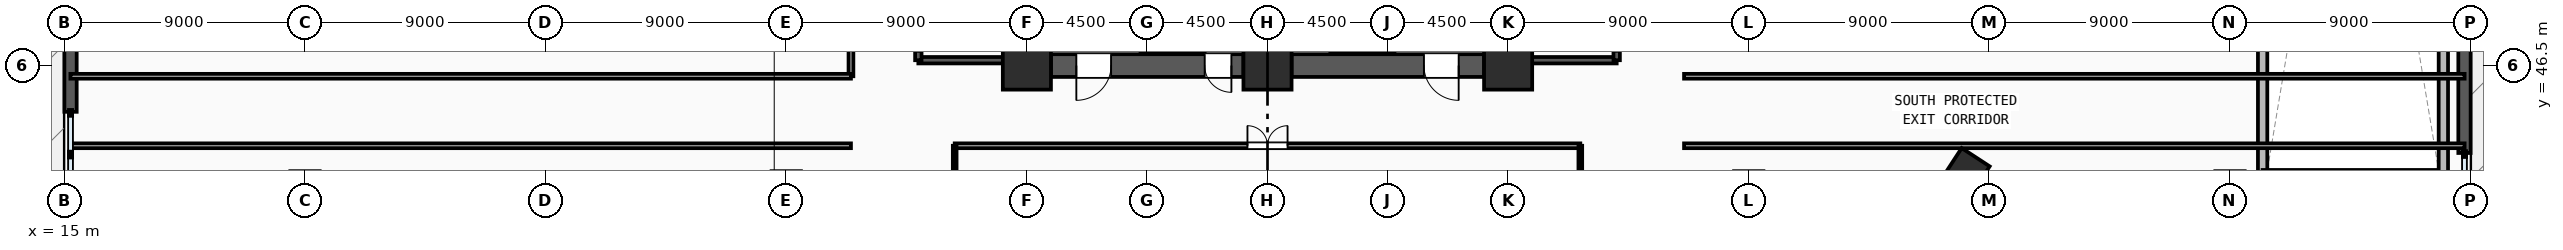
"""IFC4 building model, lengths in metres.
Left out: names, types, materials, properties, quantities, classifications, styles, units other than length and angle.
Written with IfcOpenShell. Run it as: python <this file> out.ifc"""

import sys

from ifc_helpers import new_model, si_unit, direction, frame, frame_2d, origin, origin_2d, place, context, subcontext, project, spatial, rectangle, extrude, source, transform, mapped, element, fill, save


model = new_model("IFC4")
c1 = context("Model", 3, precision=1e-05, world=origin(), true_north=direction((0.0, 1.0)))
c2 = subcontext(c1, "Body", "Model", "MODEL_VIEW")
j1 = project(units=[si_unit("LENGTHUNIT", "METRE"), si_unit("PLANEANGLEUNIT", "RADIAN")], contexts=[c1])
p1 = place(None, origin())
s1 = spatial("IfcSite", under=j1, at=p1, CompositionType="ELEMENT")
p2 = place(p1, origin())
s2 = spatial("IfcBuilding", under=s1, at=p2, CompositionType="ELEMENT")
p3 = place(p2, origin())
s3 = spatial("IfcBuildingStorey", under=s2, at=p3, CompositionType="ELEMENT", Elevation=0.0)
m1 = source(origin(), c2, "Body", "SweptSolid", [
    extrude(rectangle(XDim=1.8, YDim=1.8, at=origin_2d()), origin(), (0.0, 0.0, 1.0), 5.4),
])
for number, where, z_axis, x_axis in (
    (1, (51.0, 46.5, 0.0), (0.0, 0.0, 1.0), (1.0, 0.0, 0.0)),
    (2, (60.0, 46.5, 0.0), (0.0, 0.0, 1.0), (1.0, 0.0, 0.0)),
    (3, (69.0, 46.5, 0.0), (0.0, 0.0, 1.0), (1.0, 0.0, 0.0)),
):
    element("IfcColumn", number, at=place(p3, frame(where, z_axis=z_axis, x_axis=x_axis)), inside=s3, PredefinedType="COLUMN", context=c2, shape_type="MappedRepresentation", body=[
        mapped(m1, transform((0.0, 0.0, 0.0), x_axis=(1.0, 0.0, 0.0), y_axis=(0.0, 1.0, 0.0), z_axis=(0.0, 0.0, 1.0), scale=1.0)),
    ])
m2 = source(origin(), c2, "Body", "SweptSolid", [
    extrude(rectangle(XDim=1.55, YDim=1.25, at=origin_2d()), origin(), (0.0, 0.0, 1.0), 5.4),
])
p4 = place(p3, frame((86.064, 42.423, 0.0), z_axis=(0.0, 0.0, 1.0), x_axis=(0.546978918409, 0.837146380758, 0.0)))
e4 = element("IfcColumn", 4, at=p4, inside=s3, PredefinedType="COLUMN", context=c2, shape_type="MappedRepresentation", body=[
    mapped(m2, transform((0.0, 0.0, 0.0), x_axis=(1.0, 0.0, 0.0), y_axis=(0.0, 1.0, 0.0), z_axis=(0.0, 0.0, 1.0), scale=1.0)),
])
p5 = place(p3, frame((104.77, 43.23, 0.0), z_axis=(0.0, 0.0, 1.0), x_axis=(0.0, 1.0, 0.0)))
e5 = element("IfcWall", 5, at=p5, inside=s3, PredefinedType="SOLIDWALL", context=c2, shape_type="SweptSolid", body=[
    extrude(rectangle(XDim=42.74, YDim=0.46, at=frame_2d((21.37, 0.0))), origin(), (0.0, 0.0, 1.0), 5.15),
])
m3 = source(origin(), c2, "Body", "SweptSolid", [
    extrude(rectangle(XDim=4.0, YDim=3.8, at=frame_2d((2.0, 1.9))), frame((0.0, 0.24, 0.0), z_axis=(0.0, -1.0, 0.0), x_axis=(1.0, 0.0, 0.0)), (0.0, 0.0, 1.0), 0.48),
])
p6 = place(p5, frame((13.23, 0.0, 0.0)))
e6 = element("IfcOpeningElement", 6, at=p6, cuts=e5, PredefinedType="OPENING", context=c2, shape_type="MappedRepresentation", body=[
    mapped(m3, transform((0.0, 0.0, 0.0), x_axis=(1.0, 0.0, 0.0), y_axis=(0.0, 1.0, 0.0), z_axis=(0.0, 0.0, 1.0), scale=1.0)),
])
p7 = place(p3, frame((15.23, 64.77, 0.0), z_axis=(0.0, 0.0, 1.0), x_axis=(0.0, -1.0, 0.0)))
e7 = element("IfcWall", 7, at=p7, inside=s3, PredefinedType="SOLIDWALL", context=c2, shape_type="SweptSolid", body=[
    extrude(rectangle(XDim=20.0, YDim=0.46, at=frame_2d((10.0, 0.0))), origin(), (0.0, 0.0, 1.0), 5.15),
])
m4 = source(origin(), c2, "Body", "SweptSolid", [
    extrude(rectangle(XDim=2.1, YDim=2.4, at=frame_2d((1.05, 1.2))), frame((0.0, 0.24, 0.0), z_axis=(0.0, -1.0, 0.0), x_axis=(1.0, 0.0, 0.0)), (0.0, 0.0, 1.0), 0.48),
])
p8 = place(p7, frame((10.22, 0.0, 0.0)))
e8 = element("IfcOpeningElement", 8, at=p8, cuts=e7, PredefinedType="OPENING", context=c2, shape_type="MappedRepresentation", body=[
    mapped(m4, transform((0.0, 0.0, 0.0), x_axis=(1.0, 0.0, 0.0), y_axis=(0.0, 1.0, 0.0), z_axis=(0.0, 0.0, 1.0), scale=1.0)),
])
for number, where, z_axis, x_axis in (
    (9, (97.22, 42.42, 0.0), (0.0, 0.0, 1.0), (0.0, 1.0, 0.0)),
    (10, (103.98, 42.42, 0.0), (0.0, 0.0, 1.0), (0.0, 1.0, 0.0)),
):
    element("IfcWall", number, at=place(p3, frame(where, z_axis=z_axis, x_axis=x_axis)), inside=s3, PredefinedType="SOLIDWALL", context=c2, shape_type="SweptSolid", body=[
        extrude(rectangle(XDim=43.98, YDim=0.35, at=frame_2d((21.99, 0.0))), origin(), (0.0, 0.0, 1.0), 5.15),
    ])
p9 = place(p3, frame((68.1, 46.5, 0.0), z_axis=(0.0, 0.0, 1.0), x_axis=(-1.0, 0.0, 0.0)))
e11 = element("IfcWall", 11, at=p9, inside=s3, PredefinedType="SHEAR", context=c2, shape_type="SweptSolid", body=[
    extrude(rectangle(XDim=7.2, YDim=0.85, at=frame_2d((3.6, 0.0))), origin(), (0.0, 0.0, 1.0), 5.15),
])
m5 = source(origin(), c2, "Body", "SweptSolid", [
    extrude(rectangle(XDim=1.3, YDim=2.2, at=frame_2d((0.65, 1.1))), frame((0.0, 0.435, 0.0), z_axis=(0.0, -1.0, 0.0), x_axis=(1.0, 0.0, 0.0)), (0.0, 0.0, 1.0), 0.87),
])
p10 = place(p9, frame((0.95, 0.0, 0.0)))
e12 = element("IfcOpeningElement", 12, at=p10, cuts=e11, PredefinedType="OPENING", context=c2, shape_type="MappedRepresentation", body=[
    mapped(m5, transform((0.0, 0.0, 0.0), x_axis=(1.0, 0.0, 0.0), y_axis=(0.0, 1.0, 0.0), z_axis=(0.0, 0.0, 1.0), scale=1.0)),
])
p11 = place(p3, frame((59.1, 46.5, 0.0), z_axis=(0.0, 0.0, 1.0), x_axis=(-1.0, 0.0, 0.0)))
e13 = element("IfcWall", 13, at=p11, inside=s3, PredefinedType="SHEAR", context=c2, shape_type="SweptSolid", body=[
    extrude(rectangle(XDim=7.2, YDim=0.85, at=frame_2d((3.6, 0.0))), origin(), (0.0, 0.0, 1.0), 5.15),
])
p12 = place(p11, frame((4.95, 0.0, 0.0)))
e14 = element("IfcOpeningElement", 14, at=p12, cuts=e13, PredefinedType="OPENING", context=c2, shape_type="MappedRepresentation", body=[
    mapped(m5, transform((0.0, 0.0, 0.0), x_axis=(1.0, 0.0, 0.0), y_axis=(0.0, 1.0, 0.0), z_axis=(0.0, 0.0, 1.0), scale=1.0)),
])
m6 = source(origin(), c2, "Body", "SweptSolid", [
    extrude(rectangle(XDim=1.0, YDim=2.2, at=frame_2d((0.5, 1.1))), frame((0.0, 0.435, 0.0), z_axis=(0.0, -1.0, 0.0), x_axis=(1.0, 0.0, 0.0)), (0.0, 0.0, 1.0), 0.87),
])
p13 = place(p11, frame((0.45, 0.0, 0.0)))
e15 = element("IfcOpeningElement", 15, at=p13, cuts=e13, PredefinedType="OPENING", context=c2, shape_type="MappedRepresentation", body=[
    mapped(m6, transform((0.0, 0.0, 0.0), x_axis=(1.0, 0.0, 0.0), y_axis=(0.0, 1.0, 0.0), z_axis=(0.0, 0.0, 1.0), scale=1.0)),
])
p14 = place(p3, frame((46.94, 46.7, 0.0), z_axis=(0.0, 0.0, 1.0), x_axis=(1.0, 0.0, 0.0)))
e16 = element("IfcWall", 16, at=p14, inside=s3, PredefinedType="SOLIDWALL", context=c2, shape_type="SweptSolid", body=[
    extrude(rectangle(XDim=3.44, YDim=0.24, at=frame_2d((1.72, 0.0))), origin(), (0.0, 0.0, 1.0), 5.15),
])
p15 = place(p3, frame((50.38, 46.7, 0.0), z_axis=(0.0, 0.0, 1.0), x_axis=(0.0, 1.0, 0.0)))
e17 = element("IfcWall", 17, at=p15, inside=s3, PredefinedType="SOLIDWALL", context=c2, shape_type="SweptSolid", body=[
    extrude(rectangle(XDim=7.82, YDim=0.24, at=frame_2d((3.91, 0.0))), origin(), (0.0, 0.0, 1.0), 5.15),
])
p16 = place(p3, frame((46.94, 54.52, 0.0), z_axis=(0.0, 0.0, 1.0), x_axis=(0.0, -1.0, 0.0)))
e18 = element("IfcWall", 18, at=p16, inside=s3, PredefinedType="SOLIDWALL", context=c2, shape_type="SweptSolid", body=[
    extrude(rectangle(XDim=7.82, YDim=0.24, at=frame_2d((3.91, 0.0))), origin(), (0.0, 0.0, 1.0), 5.15),
])
m7 = source(origin(), c2, "Body", "SweptSolid", [
    extrude(rectangle(XDim=1.2, YDim=2.2, at=frame_2d((0.6, 1.1))), frame((0.0, 0.13, 0.0), z_axis=(0.0, -1.0, 0.0), x_axis=(1.0, 0.0, 0.0)), (0.0, 0.0, 1.0), 0.26),
])
p17 = place(p16, frame((6.3, 0.0, 0.0)))
e19 = element("IfcOpeningElement", 19, at=p17, cuts=e18, PredefinedType="OPENING", context=c2, shape_type="MappedRepresentation", body=[
    mapped(m7, transform((0.0, 0.0, 0.0), x_axis=(1.0, 0.0, 0.0), y_axis=(0.0, 1.0, 0.0), z_axis=(0.0, 0.0, 1.0), scale=1.0)),
])
p18 = place(p3, frame((69.62, 46.7, 0.0), z_axis=(0.0, 0.0, 1.0), x_axis=(1.0, 0.0, 0.0)))
e20 = element("IfcWall", 20, at=p18, inside=s3, PredefinedType="SOLIDWALL", context=c2, shape_type="SweptSolid", body=[
    extrude(rectangle(XDim=3.44, YDim=0.24, at=frame_2d((1.72, 0.0))), origin(), (0.0, 0.0, 1.0), 5.15),
])
p19 = place(p3, frame((73.06, 46.7, 0.0), z_axis=(0.0, 0.0, 1.0), x_axis=(0.0, 1.0, 0.0)))
e21 = element("IfcWall", 21, at=p19, inside=s3, PredefinedType="SOLIDWALL", context=c2, shape_type="SweptSolid", body=[
    extrude(rectangle(XDim=7.82, YDim=0.24, at=frame_2d((3.91, 0.0))), origin(), (0.0, 0.0, 1.0), 5.15),
])
p20 = place(p19, frame((0.32, 0.0, 0.0)))
e22 = element("IfcOpeningElement", 22, at=p20, cuts=e21, PredefinedType="OPENING", context=c2, shape_type="MappedRepresentation", body=[
    mapped(m7, transform((0.0, 0.0, 0.0), x_axis=(1.0, 0.0, 0.0), y_axis=(0.0, 1.0, 0.0), z_axis=(0.0, 0.0, 1.0), scale=1.0)),
])
p21 = place(p3, frame((69.62, 54.52, 0.0), z_axis=(0.0, 0.0, 1.0), x_axis=(0.0, -1.0, 0.0)))
e23 = element("IfcWall", 23, at=p21, inside=s3, PredefinedType="SOLIDWALL", context=c2, shape_type="SweptSolid", body=[
    extrude(rectangle(XDim=7.82, YDim=0.24, at=frame_2d((3.91, 0.0))), origin(), (0.0, 0.0, 1.0), 5.15),
])
p22 = place(p3, frame((48.3, 43.5, 0.0), z_axis=(0.0, 0.0, 1.0), x_axis=(1.0, 0.0, 0.0)))
e24 = element("IfcWall", 24, at=p22, inside=s3, PredefinedType="PARTITIONING", context=c2, shape_type="SweptSolid", body=[
    extrude(rectangle(XDim=23.4, YDim=0.18, at=frame_2d((11.7, 0.0))), origin(), (0.0, 0.0, 1.0), 5.15),
])
m8 = source(origin(), c2, "Body", "SweptSolid", [
    extrude(rectangle(XDim=1.5, YDim=2.2, at=frame_2d((0.75, 1.1))), frame((0.0, 0.1, 0.0), z_axis=(0.0, -1.0, 0.0), x_axis=(1.0, 0.0, 0.0)), (0.0, 0.0, 1.0), 0.2),
])
p23 = place(p22, frame((10.95, 0.0, 0.0)))
e25 = element("IfcOpeningElement", 25, at=p23, cuts=e24, PredefinedType="OPENING", context=c2, shape_type="MappedRepresentation", body=[
    mapped(m8, transform((0.0, 0.0, 0.0), x_axis=(1.0, 0.0, 0.0), y_axis=(0.0, 1.0, 0.0), z_axis=(0.0, 0.0, 1.0), scale=1.0)),
])
p24 = place(p3, frame((44.42, 46.1, 0.0), z_axis=(0.0, 0.0, 1.0), x_axis=(0.0, 1.0, 0.0)))
e26 = element("IfcWall", 26, at=p24, inside=s3, PredefinedType="PARTITIONING", context=c2, shape_type="SweptSolid", body=[
    extrude(rectangle(XDim=22.0, YDim=0.18, at=frame_2d((11.0, 0.0))), origin(), (0.0, 0.0, 1.0), 5.15),
])
p25 = place(p24, frame((10.25, 0.0, 0.0)))
e27 = element("IfcOpeningElement", 27, at=p25, cuts=e26, PredefinedType="OPENING", context=c2, shape_type="MappedRepresentation", body=[
    mapped(m8, transform((0.0, 0.0, 0.0), x_axis=(1.0, 0.0, 0.0), y_axis=(0.0, 1.0, 0.0), z_axis=(0.0, 0.0, 1.0), scale=1.0)),
])
for number, where, z_axis, x_axis in (
    (28, (15.225, 46.1, 0.0), (0.0, 0.0, 1.0), (1.0, 0.0, 0.0)),
    (29, (75.58, 46.1, 0.0), (0.0, 0.0, 1.0), (1.0, 0.0, 0.0)),
    (30, (15.225, 43.5, 0.0), (0.0, 0.0, 1.0), (1.0, 0.0, 0.0)),
):
    element("IfcWall", number, at=place(p3, frame(where, z_axis=z_axis, x_axis=x_axis)), inside=s3, PredefinedType="PARTITIONING", context=c2, shape_type="SweptSolid", body=[
        extrude(rectangle(XDim=29.195, YDim=0.18, at=frame_2d((14.597, 0.0))), origin(), (0.0, 0.0, 1.0), 5.15),
    ])
p26 = place(p3, frame((75.58, 43.5, 0.0), z_axis=(0.0, 0.0, 1.0), x_axis=(1.0, 0.0, 0.0)))
e31 = element("IfcWall", 31, at=p26, inside=s3, PredefinedType="PARTITIONING", context=c2, shape_type="SweptSolid", body=[
    extrude(rectangle(XDim=29.195, YDim=0.18, at=frame_2d((14.597, 0.0))), origin(), (0.0, 0.0, 1.0), 4.585),
])
for number, where, z_axis, x_axis in (
    (32, (48.3, 19.425, 0.0), (0.0, 0.0, 1.0), (0.0, 1.0, 0.0)),
    (33, (71.7, 19.425, 0.0), (0.0, 0.0, 1.0), (0.0, 1.0, 0.0)),
):
    element("IfcWall", number, at=place(p3, frame(where, z_axis=z_axis, x_axis=x_axis)), inside=s3, PredefinedType="PARTITIONING", context=c2, shape_type="SweptSolid", body=[
        extrude(rectangle(XDim=24.075, YDim=0.14, at=frame_2d((12.038, 0.0))), origin(), (0.0, 0.0, 1.0), 5.15),
    ])
m9 = source(origin(), c2, "Body", "SweptSolid", [
    extrude(rectangle(XDim=1.3, YDim=2.2, at=frame_2d((0.65, 1.1))), frame((0.0, 0.025, 0.0), z_axis=(0.0, -1.0, 0.0), x_axis=(1.0, 0.0, 0.0)), (0.0, 0.0, 1.0), 0.05),
])
p27 = place(p12, origin())
e34 = element("IfcDoor", 34, at=p27, inside=s3, OperationType="SINGLE_SWING_RIGHT", PredefinedType="DOOR", context=c2, shape_type="MappedRepresentation", body=[
    mapped(m9, transform((0.0, 0.0, 0.0), x_axis=(1.0, 0.0, 0.0), y_axis=(0.0, 1.0, 0.0), z_axis=(0.0, 0.0, 1.0), scale=1.0)),
])
fill(e14, e34)
m10 = source(origin(), c2, "Body", "SweptSolid", [
    extrude(rectangle(XDim=1.0, YDim=2.2, at=frame_2d((0.5, 1.1))), frame((0.0, 0.025, 0.0), z_axis=(0.0, -1.0, 0.0), x_axis=(1.0, 0.0, 0.0)), (0.0, 0.0, 1.0), 0.05),
])
p28 = place(p13, origin())
e35 = element("IfcDoor", 35, at=p28, inside=s3, OperationType="SINGLE_SWING_LEFT", PredefinedType="DOOR", context=c2, shape_type="MappedRepresentation", body=[
    mapped(m10, transform((0.0, 0.0, 0.0), x_axis=(1.0, 0.0, 0.0), y_axis=(0.0, 1.0, 0.0), z_axis=(0.0, 0.0, 1.0), scale=1.0)),
])
fill(e15, e35)
p29 = place(p10, origin())
e36 = element("IfcDoor", 36, at=p29, inside=s3, OperationType="SINGLE_SWING_LEFT", PredefinedType="DOOR", context=c2, shape_type="MappedRepresentation", body=[
    mapped(m9, transform((0.0, 0.0, 0.0), x_axis=(1.0, 0.0, 0.0), y_axis=(0.0, 1.0, 0.0), z_axis=(0.0, 0.0, 1.0), scale=1.0)),
])
fill(e12, e36)
m11 = source(origin(), c2, "Body", "SweptSolid", [
    extrude(rectangle(XDim=1.5, YDim=2.2, at=frame_2d((0.75, 1.1))), frame((0.0, 0.025, 0.0), z_axis=(0.0, -1.0, 0.0), x_axis=(1.0, 0.0, 0.0)), (0.0, 0.0, 1.0), 0.05),
])
p30 = place(p23, origin())
e37 = element("IfcDoor", 37, at=p30, inside=s3, OperationType="DOUBLE_DOOR_SINGLE_SWING", PredefinedType="DOOR", context=c2, shape_type="MappedRepresentation", body=[
    mapped(m11, transform((0.0, 0.0, 0.0), x_axis=(1.0, 0.0, 0.0), y_axis=(0.0, 1.0, 0.0), z_axis=(0.0, 0.0, 1.0), scale=1.0)),
])
fill(e25, e37)
save(model, sys.argv[1])
